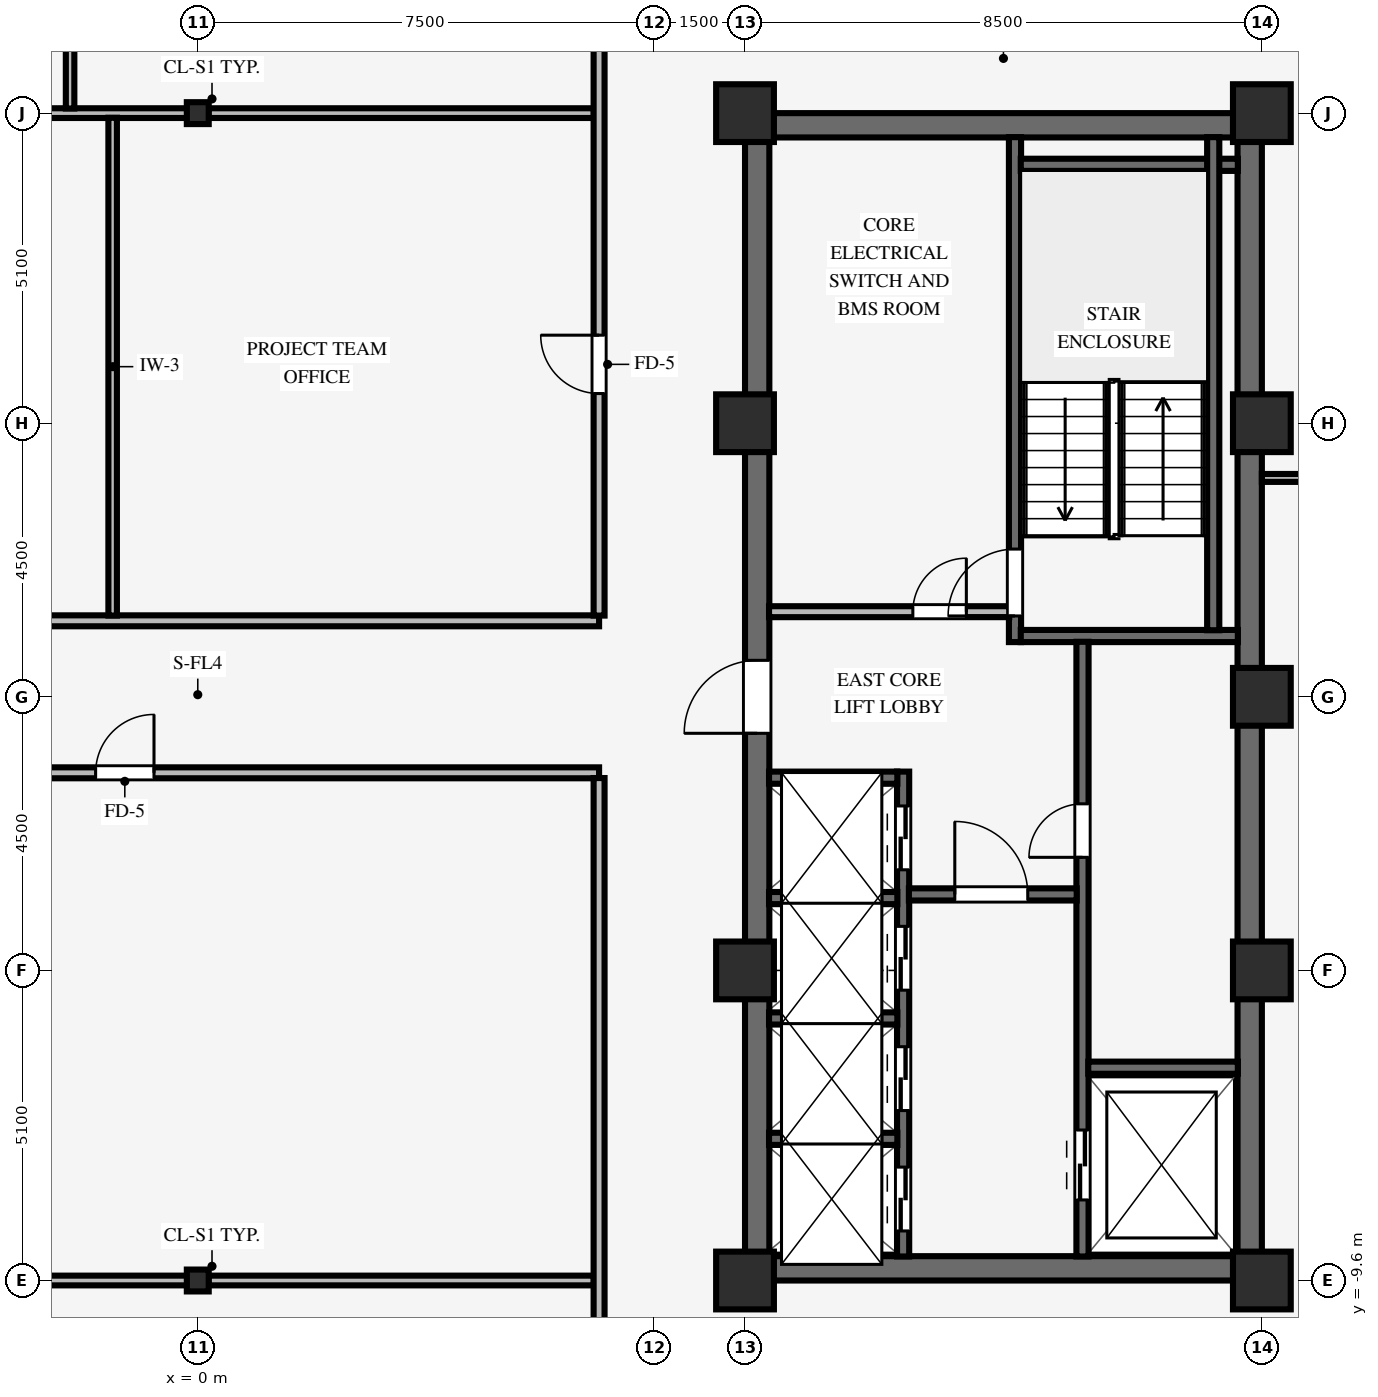
"""IFC4 building model, lengths in metres.
Left out: names, types, materials, properties, quantities, classifications, styles, units other than length and angle.
Written with IfcOpenShell. Run it as: python <this file> out.ifc"""

import sys

from ifc_helpers import new_model, si_unit, direction, frame, frame_2d, origin, origin_2d, place, context, subcontext, project, spatial, rectangle, i_section, extrude, source, transform, mapped, element, fill, save


model = new_model("IFC4")
c1 = context("Model", 3, precision=1e-05, world=origin(), true_north=direction((0.0, 1.0)))
c2 = subcontext(c1, "Body", "Model", "MODEL_VIEW")
j1 = project(units=[si_unit("LENGTHUNIT", "METRE"), si_unit("PLANEANGLEUNIT", "RADIAN")], contexts=[c1])
p1 = place(None, origin())
s1 = spatial("IfcSite", under=j1, at=p1, CompositionType="ELEMENT")
p2 = place(p1, origin())
s2 = spatial("IfcBuilding", under=s1, at=p2, CompositionType="ELEMENT")
p3 = place(p2, frame((0.0, 0.0, 160.35)))
s3 = spatial("IfcBuildingStorey", under=s2, at=p3, CompositionType="ELEMENT", Elevation=160.35)
for number, where, z_axis, x_axis in (
    (1, (9.0, -9.4, 0.0), (0.0, 0.0, 1.0), (1.0, 0.0, 0.0)),
    (2, (9.0, 9.4, 0.0), (0.0, 0.0, 1.0), (1.0, 0.0, 0.0)),
):
    element("IfcWall", number, at=place(p3, frame(where, z_axis=z_axis, x_axis=x_axis)), inside=s3, PredefinedType="SHEAR", context=c2, shape_type="SweptSolid", body=[
        extrude(rectangle(XDim=8.5, YDim=0.4, at=frame_2d((4.25, 0.0))), origin(), (0.0, 0.0, 1.0), 3.37),
    ])
p4 = place(p3, frame((9.2, -9.205, 0.0), z_axis=(0.0, 0.0, 1.0), x_axis=(0.0, 1.0, 0.0)))
e3 = element("IfcWall", 3, at=p4, inside=s3, PredefinedType="SHEAR", context=c2, shape_type="SweptSolid", body=[
    extrude(rectangle(XDim=18.41, YDim=0.4, at=frame_2d((9.205, 0.0))), origin(), (0.0, 0.0, 1.0), 3.37),
])
p5 = place(p4, frame((8.605, 0.0, 0.0)))
e4 = element("IfcOpeningElement", 4, at=p5, cuts=e3, PredefinedType="OPENING", context=c2, shape_type="SweptSolid", body=[
    extrude(rectangle(XDim=1.2, YDim=2.15, at=frame_2d((0.6, 1.075))), frame((0.0, 0.21, 0.0), z_axis=(0.0, -1.0, 0.0), x_axis=(1.0, 0.0, 0.0)), (0.0, 0.0, 1.0), 0.42),
])
p6 = place(p3, frame((17.3, -9.205, 0.0), z_axis=(0.0, 0.0, 1.0), x_axis=(0.0, 1.0, 0.0)))
e5 = element("IfcWall", 5, at=p6, inside=s3, PredefinedType="SHEAR", context=c2, shape_type="SweptSolid", body=[
    extrude(rectangle(XDim=18.41, YDim=0.4, at=frame_2d((9.205, 0.0))), origin(), (0.0, 0.0, 1.0), 3.37),
])
for number, where, z_axis, x_axis in (
    (6, (9.0, -9.6, 0.0), (0.0, 0.0, 1.0), (1.0, 0.0, 0.0)),
    (7, (9.0, -4.5, 0.0), (0.0, 0.0, 1.0), (1.0, 0.0, 0.0)),
    (8, (9.0, 4.5, 0.0), (0.0, 0.0, 1.0), (1.0, 0.0, 0.0)),
    (9, (9.0, 9.6, 0.0), (0.0, 0.0, 1.0), (1.0, 0.0, 0.0)),
    (10, (17.5, -9.6, 0.0), (0.0, 0.0, 1.0), (1.0, 0.0, 0.0)),
    (11, (17.5, -4.5, 0.0), (0.0, 0.0, 1.0), (1.0, 0.0, 0.0)),
    (12, (17.5, 4.5, 0.0), (0.0, 0.0, 1.0), (1.0, 0.0, 0.0)),
    (13, (17.5, 9.6, 0.0), (0.0, 0.0, 1.0), (1.0, 0.0, 0.0)),
    (14, (17.5, 0.0, 0.0), (0.0, 0.0, 1.0), (1.0, 0.0, 0.0)),
):
    element("IfcColumn", number, at=place(p3, frame(where, z_axis=z_axis, x_axis=x_axis)), inside=s3, PredefinedType="COLUMN", context=c2, shape_type="SweptSolid", body=[
        extrude(rectangle(XDim=0.95, YDim=0.95, at=origin_2d()), origin(), (0.0, 0.0, 1.0), 3.37),
    ])
for number, where, z_axis, x_axis in (
    (15, (0.0, -9.6, 0.0), (0.0, 0.0, 1.0), (1.0, 0.0, 0.0)),
    (16, (0.0, 9.6, 0.0), (0.0, 0.0, 1.0), (1.0, 0.0, 0.0)),
):
    element("IfcColumn", number, at=place(p3, frame(where, z_axis=z_axis, x_axis=x_axis)), inside=s3, PredefinedType="COLUMN", context=c2, shape_type="SweptSolid", body=[
        extrude(i_section(OverallWidth=0.36, OverallDepth=0.36, WebThickness=0.021, FlangeThickness=0.021, FilletRadius=0.018, at=origin_2d()), origin(), (0.0, 0.0, 1.0), 3.37),
    ])
p7 = place(p3, frame((13.44, 0.9, 0.0), z_axis=(0.0, 0.0, 1.0), x_axis=(0.0, 1.0, 0.0)))
e17 = element("IfcWall", 17, at=p7, inside=s3, PredefinedType="SHEAR", context=c2, shape_type="SweptSolid", body=[
    extrude(rectangle(XDim=8.305, YDim=0.2, at=frame_2d((4.153, 0.0))), origin(), (0.0, 0.0, 1.0), 3.37),
])
p8 = place(p7, frame((0.43, 0.0, 0.0)))
e18 = element("IfcOpeningElement", 18, at=p8, cuts=e17, PredefinedType="OPENING", context=c2, shape_type="SweptSolid", body=[
    extrude(rectangle(XDim=1.1, YDim=2.15, at=frame_2d((0.55, 1.075))), frame((0.0, 0.11, 0.0), z_axis=(0.0, -1.0, 0.0), x_axis=(1.0, 0.0, 0.0)), (0.0, 0.0, 1.0), 0.22),
])
for number, where, z_axis, x_axis in (
    (19, (13.535, 1.0, 0.0), (0.0, 0.0, 1.0), (1.0, 0.0, 0.0)),
    (20, (13.535, 8.75, 0.0), (0.0, 0.0, 1.0), (1.0, 0.0, 0.0)),
):
    element("IfcWall", number, at=place(p3, frame(where, z_axis=z_axis, x_axis=x_axis)), inside=s3, PredefinedType="SHEAR", context=c2, shape_type="SweptSolid", body=[
        extrude(rectangle(XDim=3.57, YDim=0.2, at=frame_2d((1.785, 0.0))), origin(), (0.0, 0.0, 1.0), 3.37),
    ])
p9 = place(p3, frame((16.7, 1.095, 0.0), z_axis=(0.0, 0.0, 1.0), x_axis=(0.0, 1.0, 0.0)))
e21 = element("IfcWall", 21, at=p9, inside=s3, PredefinedType="SHEAR", context=c2, shape_type="SweptSolid", body=[
    extrude(rectangle(XDim=8.11, YDim=0.2, at=frame_2d((4.055, 0.0))), origin(), (0.0, 0.0, 1.0), 3.37),
])
p10 = place(p3, frame((14.55, -9.205, 0.0), z_axis=(0.0, 0.0, 1.0), x_axis=(0.0, 1.0, 0.0)))
e22 = element("IfcWall", 22, at=p10, inside=s3, PredefinedType="SHEAR", context=c2, shape_type="SweptSolid", body=[
    extrude(rectangle(XDim=10.11, YDim=0.2, at=frame_2d((5.055, 0.0))), origin(), (0.0, 0.0, 1.0), 3.37),
])
p11 = place(p10, frame((6.565, 0.0, 0.0)))
e23 = element("IfcOpeningElement", 23, at=p11, cuts=e22, PredefinedType="OPENING", context=c2, shape_type="SweptSolid", body=[
    extrude(rectangle(XDim=0.88, YDim=2.1, at=frame_2d((0.44, 1.05))), frame((0.0, 0.11, 0.0), z_axis=(0.0, -1.0, 0.0), x_axis=(1.0, 0.0, 0.0)), (0.0, 0.0, 1.0), 0.22),
])
p12 = place(p10, frame((0.93, 0.0, 0.0)))
e24 = element("IfcOpeningElement", 24, at=p12, cuts=e22, PredefinedType="OPENING", context=c2, shape_type="SweptSolid", body=[
    extrude(rectangle(XDim=1.15, YDim=2.15, at=frame_2d((0.575, 1.075))), frame((0.0, 0.11, 0.0), z_axis=(0.0, -1.0, 0.0), x_axis=(1.0, 0.0, 0.0)), (0.0, 0.0, 1.0), 0.22),
])
p13 = place(p3, frame((14.645, -6.1, 0.0), z_axis=(0.0, 0.0, 1.0), x_axis=(1.0, 0.0, 0.0)))
e25 = element("IfcWall", 25, at=p13, inside=s3, PredefinedType="SHEAR", context=c2, shape_type="SweptSolid", body=[
    extrude(rectangle(XDim=2.46, YDim=0.2, at=frame_2d((1.23, 0.0))), origin(), (0.0, 0.0, 1.0), 3.37),
])
p14 = place(p3, frame((11.6, -9.205, 0.0), z_axis=(0.0, 0.0, 1.0), x_axis=(0.0, 1.0, 0.0)))
e26 = element("IfcWall", 26, at=p14, inside=s3, PredefinedType="SHEAR", context=c2, shape_type="SweptSolid", body=[
    extrude(rectangle(XDim=7.975, YDim=0.2, at=frame_2d((3.988, 0.0))), origin(), (0.0, 0.0, 1.0), 3.37),
])
p15 = place(p14, frame((0.42, 0.0, 0.0)))
e27 = element("IfcOpeningElement", 27, at=p15, cuts=e26, PredefinedType="OPENING", context=c2, shape_type="SweptSolid", body=[
    extrude(rectangle(XDim=1.05, YDim=2.15, at=frame_2d((0.525, 1.075))), frame((0.0, 0.11, 0.0), z_axis=(0.0, -1.0, 0.0), x_axis=(1.0, 0.0, 0.0)), (0.0, 0.0, 1.0), 0.22),
])
p16 = place(p14, frame((2.4, 0.0, 0.0)))
e28 = element("IfcOpeningElement", 28, at=p16, cuts=e26, PredefinedType="OPENING", context=c2, shape_type="SweptSolid", body=[
    extrude(rectangle(XDim=1.05, YDim=2.15, at=frame_2d((0.525, 1.075))), frame((0.0, 0.11, 0.0), z_axis=(0.0, -1.0, 0.0), x_axis=(1.0, 0.0, 0.0)), (0.0, 0.0, 1.0), 0.22),
])
p17 = place(p14, frame((4.38, 0.0, 0.0)))
e29 = element("IfcOpeningElement", 29, at=p17, cuts=e26, PredefinedType="OPENING", context=c2, shape_type="SweptSolid", body=[
    extrude(rectangle(XDim=1.05, YDim=2.15, at=frame_2d((0.525, 1.075))), frame((0.0, 0.11, 0.0), z_axis=(0.0, -1.0, 0.0), x_axis=(1.0, 0.0, 0.0)), (0.0, 0.0, 1.0), 0.22),
])
p18 = place(p14, frame((6.36, 0.0, 0.0)))
e30 = element("IfcOpeningElement", 30, at=p18, cuts=e26, PredefinedType="OPENING", context=c2, shape_type="SweptSolid", body=[
    extrude(rectangle(XDim=1.05, YDim=2.15, at=frame_2d((0.525, 1.075))), frame((0.0, 0.11, 0.0), z_axis=(0.0, -1.0, 0.0), x_axis=(1.0, 0.0, 0.0)), (0.0, 0.0, 1.0), 0.22),
])
p19 = place(p3, frame((11.695, -3.25, 0.0), z_axis=(0.0, 0.0, 1.0), x_axis=(1.0, 0.0, 0.0)))
e31 = element("IfcWall", 31, at=p19, inside=s3, PredefinedType="SHEAR", context=c2, shape_type="SweptSolid", body=[
    extrude(rectangle(XDim=2.76, YDim=0.2, at=frame_2d((1.38, 0.0))), origin(), (0.0, 0.0, 1.0), 3.37),
])
p20 = place(p19, frame((0.755, 0.0, 0.0)))
e32 = element("IfcOpeningElement", 32, at=p20, cuts=e31, PredefinedType="OPENING", context=c2, shape_type="SweptSolid", body=[
    extrude(rectangle(XDim=1.2, YDim=2.15, at=frame_2d((0.6, 1.075))), frame((0.0, 0.11, 0.0), z_axis=(0.0, -1.0, 0.0), x_axis=(1.0, 0.0, 0.0)), (0.0, 0.0, 1.0), 0.22),
])
for number, where, z_axis, x_axis in (
    (33, (9.395, -7.27, 0.0), (0.0, 0.0, 1.0), (1.0, 0.0, 0.0)),
    (34, (9.395, -5.29, 0.0), (0.0, 0.0, 1.0), (1.0, 0.0, 0.0)),
    (35, (9.395, -3.31, 0.0), (0.0, 0.0, 1.0), (1.0, 0.0, 0.0)),
    (36, (9.395, -1.33, 0.0), (0.0, 0.0, 1.0), (1.0, 0.0, 0.0)),
):
    element("IfcWall", number, at=place(p3, frame(where, z_axis=z_axis, x_axis=x_axis)), inside=s3, PredefinedType="SHEAR", context=c2, shape_type="SweptSolid", body=[
        extrude(rectangle(XDim=2.11, YDim=0.2, at=frame_2d((1.055, 0.0))), origin(), (0.0, 0.0, 1.0), 3.37),
    ])
p21 = place(p3, frame((9.395, 1.4, 0.0), z_axis=(0.0, 0.0, 1.0), x_axis=(1.0, 0.0, 0.0)))
e37 = element("IfcWall", 37, at=p21, inside=s3, PredefinedType="PARTITIONING", context=c2, shape_type="SweptSolid", body=[
    extrude(rectangle(XDim=3.95, YDim=0.18, at=frame_2d((1.975, 0.0))), origin(), (0.0, 0.0, 1.0), 3.36),
])
p22 = place(p21, frame((2.365, 0.0, 0.0)))
e38 = element("IfcOpeningElement", 38, at=p22, cuts=e37, PredefinedType="OPENING", context=c2, shape_type="SweptSolid", body=[
    extrude(rectangle(XDim=0.88, YDim=2.1, at=frame_2d((0.44, 1.05))), frame((0.0, 0.1, 0.0), z_axis=(0.0, -1.0, 0.0), x_axis=(1.0, 0.0, 0.0)), (0.0, 0.0, 1.0), 0.2),
])
p23 = place(p3, frame((-8.529, -9.6, 0.0), z_axis=(0.0, 0.0, 1.0), x_axis=(1.0, 0.0, 0.0)))
e39 = element("IfcWall", 39, at=p23, inside=s3, PredefinedType="PARTITIONING", context=c2, shape_type="SweptSolid", body=[
    extrude(rectangle(XDim=8.353, YDim=0.16, at=frame_2d((4.177, 0.0))), origin(), (0.0, 0.0, 1.0), 2.405),
])
p24 = place(p3, frame((0.176, -9.6, 0.0), z_axis=(0.0, 0.0, 1.0), x_axis=(1.0, 0.0, 0.0)))
e40 = element("IfcWall", 40, at=p24, inside=s3, PredefinedType="PARTITIONING", context=c2, shape_type="SweptSolid", body=[
    extrude(rectangle(XDim=6.338, YDim=0.16, at=frame_2d((3.169, 0.0))), origin(), (0.0, 0.0, 1.0), 2.405),
])
p25 = place(p3, frame((-9.0, -1.25, 0.0), z_axis=(0.0, 0.0, 1.0), x_axis=(1.0, 0.0, 0.0)))
e41 = element("IfcWall", 41, at=p25, inside=s3, PredefinedType="PARTITIONING", context=c2, shape_type="SweptSolid", body=[
    extrude(rectangle(XDim=15.6, YDim=0.18, at=frame_2d((7.8, 0.0))), origin(), (0.0, 0.0, 1.0), 3.36),
])
p26 = place(p25, frame((7.32, 0.0, 0.0)))
e42 = element("IfcOpeningElement", 42, at=p26, cuts=e41, PredefinedType="OPENING", context=c2, shape_type="SweptSolid", body=[
    extrude(rectangle(XDim=0.96, YDim=2.1, at=frame_2d((0.48, 1.05))), frame((0.0, 0.1, 0.0), z_axis=(0.0, -1.0, 0.0), x_axis=(1.0, 0.0, 0.0)), (0.0, 0.0, 1.0), 0.2),
])
p27 = place(p3, frame((-9.0, 1.25, 0.0), z_axis=(0.0, 0.0, 1.0), x_axis=(1.0, 0.0, 0.0)))
e43 = element("IfcWall", 43, at=p27, inside=s3, PredefinedType="PARTITIONING", context=c2, shape_type="SweptSolid", body=[
    extrude(rectangle(XDim=15.6, YDim=0.18, at=frame_2d((7.8, 0.0))), origin(), (0.0, 0.0, 1.0), 3.36),
])
p28 = place(p27, frame((3.32, 0.0, 0.0)))
e44 = element("IfcOpeningElement", 44, at=p28, cuts=e43, PredefinedType="OPENING", context=c2, shape_type="SweptSolid", body=[
    extrude(rectangle(XDim=0.96, YDim=2.1, at=frame_2d((0.48, 1.05))), frame((0.0, 0.1, 0.0), z_axis=(0.0, -1.0, 0.0), x_axis=(1.0, 0.0, 0.0)), (0.0, 0.0, 1.0), 0.2),
])
p29 = place(p3, frame((17.5, 3.6, 0.0), z_axis=(0.0, 0.0, 1.0), x_axis=(1.0, 0.0, 0.0)))
e45 = element("IfcWall", 45, at=p29, inside=s3, PredefinedType="PARTITIONING", context=c2, shape_type="SweptSolid", body=[
    extrude(rectangle(XDim=8.58, YDim=0.13, at=frame_2d((4.29, 0.0))), origin(), (0.0, 0.0, 1.0), 3.36),
])
p30 = place(p3, frame((-8.529, 9.6, 0.0), z_axis=(0.0, 0.0, 1.0), x_axis=(1.0, 0.0, 0.0)))
e46 = element("IfcWall", 46, at=p30, inside=s3, PredefinedType="PARTITIONING", context=c2, shape_type="SweptSolid", body=[
    extrude(rectangle(XDim=8.353, YDim=0.16, at=frame_2d((4.177, 0.0))), origin(), (0.0, 0.0, 1.0), 2.405),
])
p31 = place(p3, frame((0.176, 9.6, 0.0), z_axis=(0.0, 0.0, 1.0), x_axis=(1.0, 0.0, 0.0)))
e47 = element("IfcWall", 47, at=p31, inside=s3, PredefinedType="PARTITIONING", context=c2, shape_type="SweptSolid", body=[
    extrude(rectangle(XDim=6.338, YDim=0.16, at=frame_2d((3.169, 0.0))), origin(), (0.0, 0.0, 1.0), 2.405),
])
p32 = place(p3, frame((-2.1, 9.676, 0.0), z_axis=(0.0, 0.0, 1.0), x_axis=(0.0, 1.0, 0.0)))
e48 = element("IfcWall", 48, at=p32, inside=s3, PredefinedType="PARTITIONING", context=c2, shape_type="SweptSolid", body=[
    extrude(rectangle(XDim=3.738, YDim=0.14, at=frame_2d((1.869, 0.0))), origin(), (0.0, 0.0, 1.0), 3.36),
])
p33 = place(p3, frame((-1.4, 1.336, 0.0), z_axis=(0.0, 0.0, 1.0), x_axis=(0.0, 1.0, 0.0)))
e49 = element("IfcWall", 49, at=p33, inside=s3, PredefinedType="PARTITIONING", context=c2, shape_type="SweptSolid", body=[
    extrude(rectangle(XDim=8.188, YDim=0.14, at=frame_2d((4.094, 0.0))), origin(), (0.0, 0.0, 1.0), 3.36),
])
p34 = place(p3, frame((6.6, -13.414, 0.0), z_axis=(0.0, 0.0, 1.0), x_axis=(0.0, 1.0, 0.0)))
e50 = element("IfcWall", 50, at=p34, inside=s3, PredefinedType="PARTITIONING", context=c2, shape_type="SweptSolid", body=[
    extrude(rectangle(XDim=12.078, YDim=0.18, at=frame_2d((6.039, 0.0))), origin(), (0.0, 0.0, 1.0), 3.36),
])
p35 = place(p3, frame((6.6, 1.336, 0.0), z_axis=(0.0, 0.0, 1.0), x_axis=(0.0, 1.0, 0.0)))
e51 = element("IfcWall", 51, at=p35, inside=s3, PredefinedType="PARTITIONING", context=c2, shape_type="SweptSolid", body=[
    extrude(rectangle(XDim=12.078, YDim=0.18, at=frame_2d((6.039, 0.0))), origin(), (0.0, 0.0, 1.0), 3.36),
])
p36 = place(p35, frame((3.652, 0.0, 0.0)))
e52 = element("IfcOpeningElement", 52, at=p36, cuts=e51, PredefinedType="OPENING", context=c2, shape_type="SweptSolid", body=[
    extrude(rectangle(XDim=0.96, YDim=2.1, at=frame_2d((0.48, 1.05))), frame((0.0, 0.1, 0.0), z_axis=(0.0, -1.0, 0.0), x_axis=(1.0, 0.0, 0.0)), (0.0, 0.0, 1.0), 0.2),
])
m1 = source(origin(), c2, "Body", "SweptSolid", [
    extrude(rectangle(XDim=1.1, YDim=2.15, at=frame_2d((0.55, 1.075))), frame((0.0, 0.025, 0.0), z_axis=(0.0, -1.0, 0.0), x_axis=(1.0, 0.0, 0.0)), (0.0, 0.0, 1.0), 0.05),
])
p37 = place(p8, origin())
e53 = element("IfcDoor", 53, at=p37, inside=s3, OperationType="SINGLE_SWING_LEFT", PredefinedType="DOOR", context=c2, shape_type="MappedRepresentation", body=[
    mapped(m1, transform((0.0, 0.0, 0.0), scale=1.0)),
])
fill(e18, e53)
m2 = source(origin(), c2, "Body", "SweptSolid", [
    extrude(rectangle(XDim=0.88, YDim=2.1, at=frame_2d((0.44, 1.05))), frame((0.0, 0.025, 0.0), z_axis=(0.0, -1.0, 0.0), x_axis=(1.0, 0.0, 0.0)), (0.0, 0.0, 1.0), 0.05),
])
p38 = place(p11, origin())
e54 = element("IfcDoor", 54, at=p38, inside=s3, OperationType="SINGLE_SWING_LEFT", PredefinedType="DOOR", context=c2, shape_type="MappedRepresentation", body=[
    mapped(m2, transform((0.0, 0.0, 0.0), scale=1.0)),
])
fill(e23, e54)
m3 = source(origin(), c2, "Body", "SweptSolid", [
    extrude(rectangle(XDim=1.2, YDim=2.15, at=frame_2d((0.6, 1.075))), frame((0.0, 0.025, 0.0), z_axis=(0.0, -1.0, 0.0), x_axis=(1.0, 0.0, 0.0)), (0.0, 0.0, 1.0), 0.05),
])
p39 = place(p20, origin())
e55 = element("IfcDoor", 55, at=p39, inside=s3, OperationType="SINGLE_SWING_LEFT", PredefinedType="DOOR", context=c2, shape_type="MappedRepresentation", body=[
    mapped(m3, transform((0.0, 0.0, 0.0), scale=1.0)),
])
fill(e32, e55)
p40 = place(p5, origin())
e56 = element("IfcDoor", 56, at=p40, inside=s3, OperationType="SINGLE_SWING_LEFT", PredefinedType="DOOR", context=c2, shape_type="MappedRepresentation", body=[
    mapped(m3, transform((0.0, 0.0, 0.0), scale=1.0)),
])
fill(e4, e56)
p41 = place(p22, origin())
e57 = element("IfcDoor", 57, at=p41, inside=s3, OperationType="SINGLE_SWING_RIGHT", PredefinedType="DOOR", context=c2, shape_type="MappedRepresentation", body=[
    mapped(m2, transform((0.0, 0.0, 0.0), scale=1.0)),
])
fill(e38, e57)
m4 = source(origin(), c2, "Body", "SweptSolid", [
    extrude(rectangle(XDim=1.15, YDim=2.15, at=frame_2d((0.575, 1.075))), frame((0.0, 0.025, 0.0), z_axis=(0.0, -1.0, 0.0), x_axis=(1.0, 0.0, 0.0)), (0.0, 0.0, 1.0), 0.05),
])
p42 = place(p12, origin())
e58 = element("IfcDoor", 58, at=p42, inside=s3, OperationType="DOUBLE_DOOR_SLIDING", PredefinedType="DOOR", context=c2, shape_type="MappedRepresentation", body=[
    mapped(m4, transform((0.0, 0.0, 0.0), scale=1.0)),
])
fill(e24, e58)
m5 = source(origin(), c2, "Body", "SweptSolid", [
    extrude(rectangle(XDim=1.05, YDim=2.15, at=frame_2d((0.525, 1.075))), frame((0.0, 0.025, 0.0), z_axis=(0.0, -1.0, 0.0), x_axis=(1.0, 0.0, 0.0)), (0.0, 0.0, 1.0), 0.05),
])
p43 = place(p15, origin())
e59 = element("IfcDoor", 59, at=p43, inside=s3, OperationType="DOUBLE_DOOR_SLIDING", PredefinedType="DOOR", context=c2, shape_type="MappedRepresentation", body=[
    mapped(m5, transform((0.0, 0.0, 0.0), scale=1.0)),
])
fill(e27, e59)
p44 = place(p16, origin())
e60 = element("IfcDoor", 60, at=p44, inside=s3, OperationType="DOUBLE_DOOR_SLIDING", PredefinedType="DOOR", context=c2, shape_type="MappedRepresentation", body=[
    mapped(m5, transform((0.0, 0.0, 0.0), scale=1.0)),
])
fill(e28, e60)
p45 = place(p17, origin())
e61 = element("IfcDoor", 61, at=p45, inside=s3, OperationType="DOUBLE_DOOR_SLIDING", PredefinedType="DOOR", context=c2, shape_type="MappedRepresentation", body=[
    mapped(m5, transform((0.0, 0.0, 0.0), scale=1.0)),
])
fill(e29, e61)
p46 = place(p18, origin())
e62 = element("IfcDoor", 62, at=p46, inside=s3, OperationType="DOUBLE_DOOR_SLIDING", PredefinedType="DOOR", context=c2, shape_type="MappedRepresentation", body=[
    mapped(m5, transform((0.0, 0.0, 0.0), scale=1.0)),
])
fill(e30, e62)
m6 = source(origin(), c2, "Body", "SweptSolid", [
    extrude(rectangle(XDim=0.96, YDim=2.1, at=frame_2d((0.48, 1.05))), frame((0.0, 0.025, 0.0), z_axis=(0.0, -1.0, 0.0), x_axis=(1.0, 0.0, 0.0)), (0.0, 0.0, 1.0), 0.05),
])
p47 = place(p26, origin())
e63 = element("IfcDoor", 63, at=p47, inside=s3, OperationType="SINGLE_SWING_RIGHT", PredefinedType="DOOR", context=c2, shape_type="MappedRepresentation", body=[
    mapped(m6, transform((0.0, 0.0, 0.0), scale=1.0)),
])
fill(e42, e63)
p48 = place(p36, origin())
e64 = element("IfcDoor", 64, at=p48, inside=s3, OperationType="SINGLE_SWING_RIGHT", PredefinedType="DOOR", context=c2, shape_type="MappedRepresentation", body=[
    mapped(m6, transform((0.0, 0.0, 0.0), scale=1.0)),
])
fill(e52, e64)
save(model, sys.argv[1])
